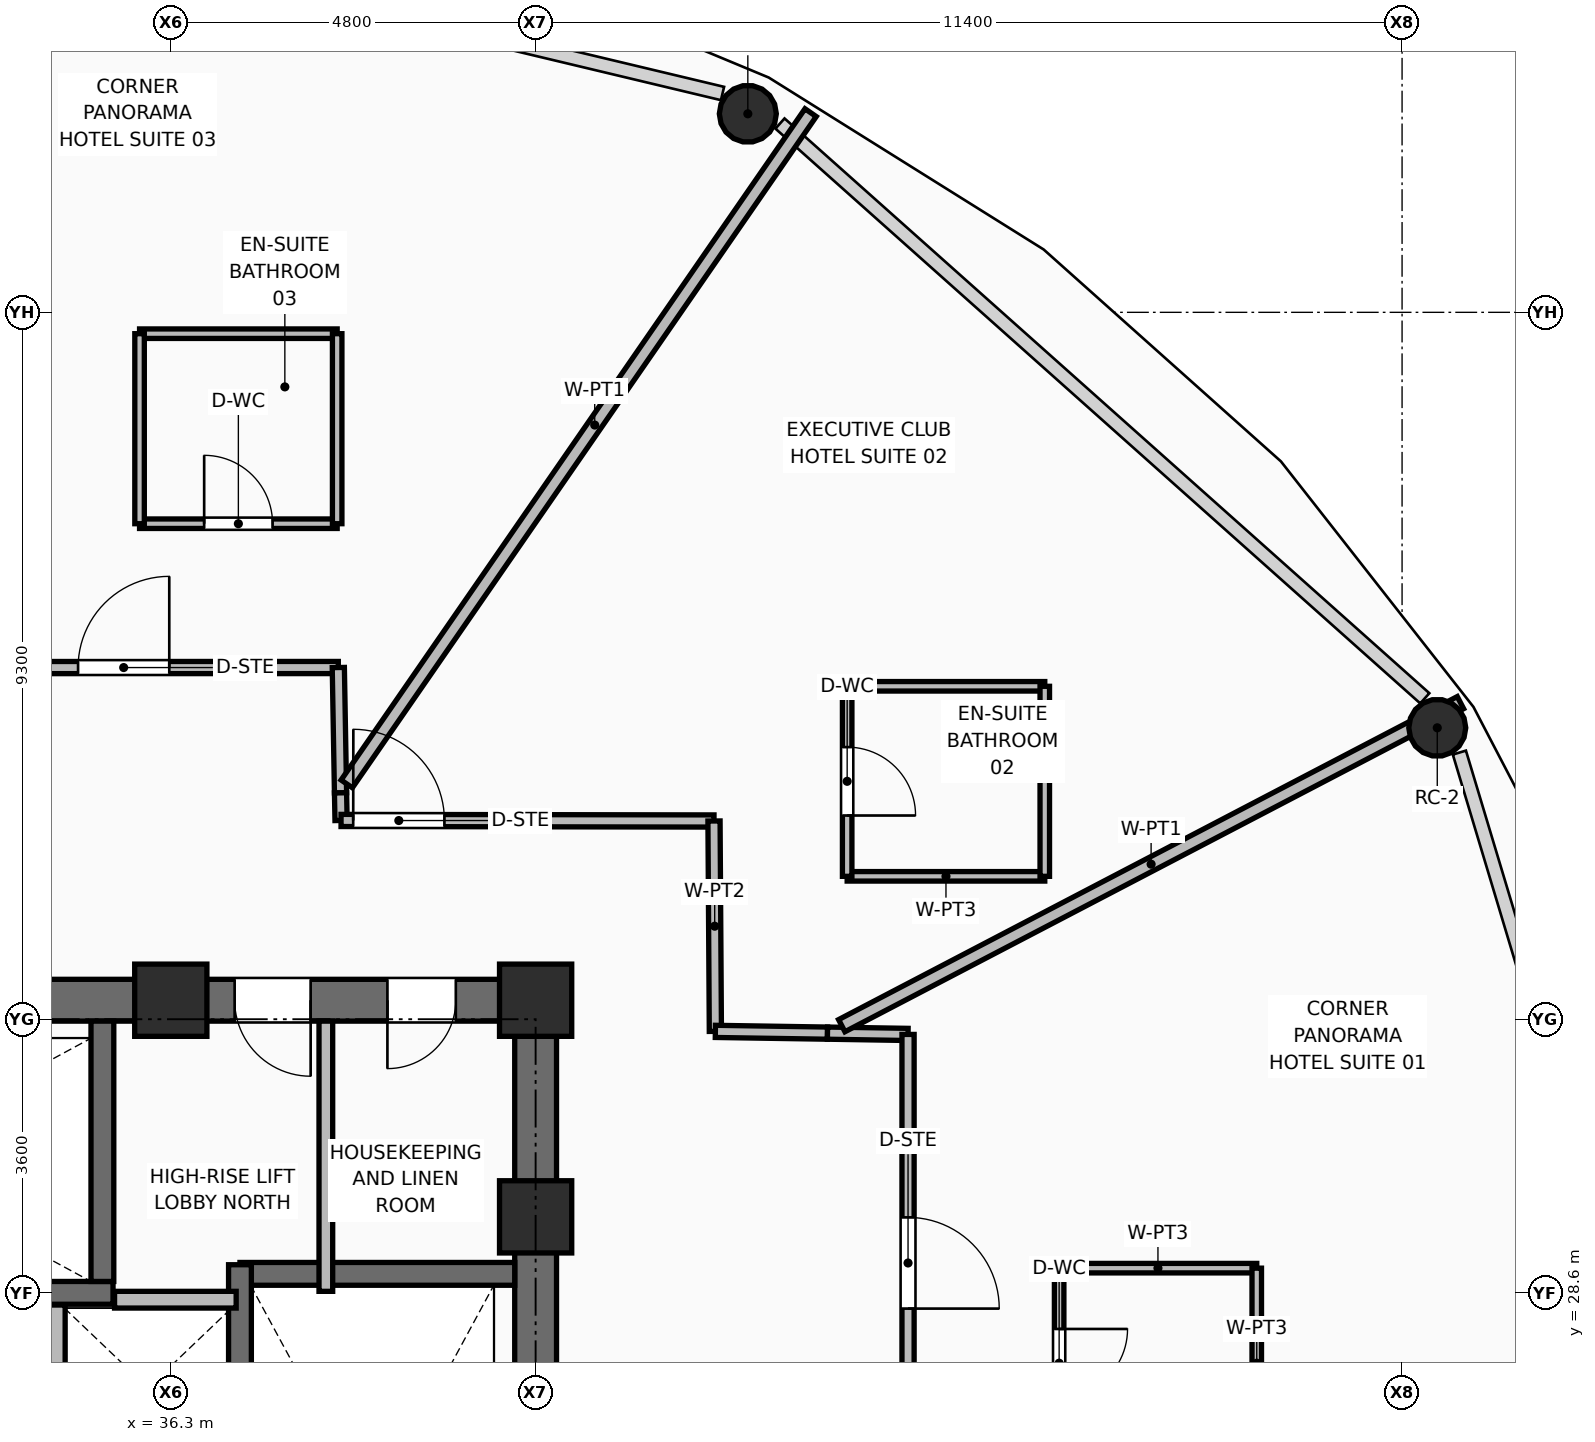
"""IFC4 building model, lengths in metres.
Left out: names, types, materials, properties, quantities, classifications, styles, units other than length and angle.
Written with IfcOpenShell. Run it as: python <this file> out.ifc"""

import sys

from ifc_helpers import new_model, si_unit, direction, frame, frame_2d, origin, origin_2d, place, context, subcontext, project, spatial, rectangle, hollow_circle, extrude, element, fill, save


model = new_model("IFC4")
c1 = context("Model", 3, precision=1e-05, world=origin(), true_north=direction((0.0, 1.0)))
c2 = subcontext(c1, "Body", "Model", "MODEL_VIEW")
j1 = project(units=[si_unit("LENGTHUNIT", "METRE"), si_unit("PLANEANGLEUNIT", "RADIAN")], contexts=[c1])
p1 = place(None, origin())
s1 = spatial("IfcSite", under=j1, at=p1, CompositionType="ELEMENT")
p2 = place(p1, origin())
s2 = spatial("IfcBuilding", under=s1, at=p2, CompositionType="ELEMENT")
p3 = place(p2, frame((0.0, 0.0, 157.2)))
s3 = spatial("IfcBuildingStorey", under=s2, at=p3, CompositionType="ELEMENT", Elevation=157.2)
for number, where, z_axis, x_axis in (
    (1, (41.1, 29.6, 0.0), (0.0, 0.0, 1.0), (1.0, 0.0, 0.0)),
    (2, (36.3, 32.45, 0.0), (0.0, 0.0, 1.0), (1.0, 0.0, 0.0)),
    (3, (41.1, 32.45, 0.0), (0.0, 0.0, 1.0), (1.0, 0.0, 0.0)),
):
    element("IfcColumn", number, at=place(p3, frame(where, z_axis=z_axis, x_axis=x_axis)), inside=s3, PredefinedType="COLUMN", context=c2, shape_type="SweptSolid", body=[
        extrude(rectangle(XDim=0.95, YDim=0.95, at=origin_2d()), origin(), (0.0, 0.0, 1.0), 3.75),
    ])
for number, where, z_axis, x_axis in (
    (4, (52.963, 36.034, 0.0), (0.0, 0.0, 1.0), (1.0, 0.0, 0.0)),
    (5, (43.892, 44.112, 0.0), (0.0, 0.0, 1.0), (1.0, 0.0, 0.0)),
):
    element("IfcColumn", number, at=place(p3, frame(where, z_axis=z_axis, x_axis=x_axis)), inside=s3, PredefinedType="COLUMN", context=c2, shape_type="SweptSolid", body=[
        extrude(hollow_circle(Radius=0.375, WallThickness=0.035, at=origin_2d()), origin(), (0.0, 0.0, 1.0), 3.57),
    ])
p4 = place(p3, frame((34.8, 26.23, 0.0), z_axis=(0.0, 0.0, 1.0), x_axis=(0.0, 1.0, 0.0)))
e6 = element("IfcWall", 6, at=p4, inside=s3, PredefinedType="PARTITIONING", context=c2, shape_type="SweptSolid", body=[
    extrude(rectangle(XDim=2.21, YDim=0.22, at=frame_2d((1.105, 0.0))), origin(), (0.0, 0.0, 1.0), 3.545),
])
p5 = place(p3, frame((21.625, 32.45, 0.0), z_axis=(0.0, 0.0, 1.0), x_axis=(1.0, 0.0, 0.0)))
e7 = element("IfcWall", 7, at=p5, inside=s3, PredefinedType="SHEAR", context=c2, shape_type="SweptSolid", body=[
    extrude(rectangle(XDim=19.75, YDim=0.55, at=frame_2d((9.875, 0.0))), origin(), (0.0, 0.0, 1.0), 3.57),
])
p6 = place(p5, frame((2.125, 0.0, 0.0)))
e8 = element("IfcOpeningElement", 8, at=p6, cuts=e7, PredefinedType="OPENING", context=c2, shape_type="SweptSolid", body=[
    extrude(rectangle(XDim=1.1, YDim=2.1, at=frame_2d((0.55, 1.05))), frame((0.0, 0.285, 0.0), z_axis=(0.0, -1.0, 0.0), x_axis=(1.0, 0.0, 0.0)), (0.0, 0.0, 1.0), 0.57),
])
p7 = place(p5, frame((15.515, 0.0, 0.0)))
e9 = element("IfcOpeningElement", 9, at=p7, cuts=e7, PredefinedType="OPENING", context=c2, shape_type="SweptSolid", body=[
    extrude(rectangle(XDim=1.0, YDim=2.1, at=frame_2d((0.5, 1.05))), frame((0.0, 0.285, 0.0), z_axis=(0.0, -1.0, 0.0), x_axis=(1.0, 0.0, 0.0)), (0.0, 0.0, 1.0), 0.57),
])
p8 = place(p5, frame((17.525, 0.0, 0.0)))
e10 = element("IfcOpeningElement", 10, at=p8, cuts=e7, PredefinedType="OPENING", context=c2, shape_type="SweptSolid", body=[
    extrude(rectangle(XDim=0.9, YDim=2.1, at=frame_2d((0.45, 1.05))), frame((0.0, 0.285, 0.0), z_axis=(0.0, -1.0, 0.0), x_axis=(1.0, 0.0, 0.0)), (0.0, 0.0, 1.0), 0.57),
])
p9 = place(p3, frame((41.1, 18.075, 0.0), z_axis=(0.0, 0.0, 1.0), x_axis=(0.0, 1.0, 0.0)))
e11 = element("IfcWall", 11, at=p9, inside=s3, PredefinedType="SHEAR", context=c2, shape_type="SweptSolid", body=[
    extrude(rectangle(XDim=14.1, YDim=0.55, at=frame_2d((7.05, 0.0))), origin(), (0.0, 0.0, 1.0), 3.57),
])
p10 = place(p9, frame((3.385, 0.0, 0.0)))
e12 = element("IfcOpeningElement", 12, at=p10, cuts=e11, PredefinedType="OPENING", context=c2, shape_type="SweptSolid", body=[
    extrude(rectangle(XDim=1.05, YDim=2.1, at=frame_2d((0.525, 1.05))), frame((0.0, 0.285, 0.0), z_axis=(0.0, -1.0, 0.0), x_axis=(1.0, 0.0, 0.0)), (0.0, 0.0, 1.0), 0.57),
])
p11 = place(p3, frame((37.21, 28.85, 0.0), z_axis=(0.0, 0.0, 1.0), x_axis=(1.0, 0.0, 0.0)))
e13 = element("IfcWall", 13, at=p11, inside=s3, PredefinedType="SHEAR", context=c2, shape_type="SweptSolid", body=[
    extrude(rectangle(XDim=3.615, YDim=0.3, at=frame_2d((1.808, 0.0))), origin(), (0.0, 0.0, 1.0), 3.57),
])
p12 = place(p3, frame((37.21, 20.98, 0.0), z_axis=(0.0, 0.0, 1.0), x_axis=(0.0, 1.0, 0.0)))
e14 = element("IfcWall", 14, at=p12, inside=s3, PredefinedType="SHEAR", context=c2, shape_type="SweptSolid", body=[
    extrude(rectangle(XDim=7.99, YDim=0.3, at=frame_2d((3.995, 0.0))), origin(), (0.0, 0.0, 1.0), 3.57),
])
p13 = place(p3, frame((27.51, 28.6, 0.0), z_axis=(0.0, 0.0, 1.0), x_axis=(1.0, 0.0, 0.0)))
e15 = element("IfcWall", 15, at=p13, inside=s3, PredefinedType="SHEAR", context=c2, shape_type="SweptSolid", body=[
    extrude(rectangle(XDim=8.03, YDim=0.3, at=frame_2d((4.015, 0.0))), origin(), (0.0, 0.0, 1.0), 3.57),
])
p14 = place(p3, frame((35.4, 28.75, 0.0), z_axis=(0.0, 0.0, 1.0), x_axis=(0.0, 1.0, 0.0)))
e16 = element("IfcWall", 16, at=p14, inside=s3, PredefinedType="SHEAR", context=c2, shape_type="SweptSolid", body=[
    extrude(rectangle(XDim=3.425, YDim=0.3, at=frame_2d((1.712, 0.0))), origin(), (0.0, 0.0, 1.0), 3.57),
])
p15 = place(p3, frame((35.56, 28.51, 0.0), z_axis=(0.0, 0.0, 1.0), x_axis=(1.0, 0.0, 0.0)))
e17 = element("IfcWall", 17, at=p15, inside=s3, PredefinedType="PARTITIONING", context=c2, shape_type="SweptSolid", body=[
    extrude(rectangle(XDim=1.6, YDim=0.22, at=frame_2d((0.8, 0.0))), origin(), (0.0, 0.0, 1.0), 3.55),
])
p16 = place(p3, frame((38.34, 28.62, 0.0), z_axis=(0.0, 0.0, 1.0), x_axis=(0.0, 1.0, 0.0)))
e18 = element("IfcWall", 18, at=p16, inside=s3, PredefinedType="PARTITIONING", context=c2, shape_type="SweptSolid", body=[
    extrude(rectangle(XDim=3.555, YDim=0.18, at=frame_2d((1.777, 0.0))), origin(), (0.0, 0.0, 1.0), 3.55),
])
p17 = place(p3, frame((32.414, 36.826, 0.0), z_axis=(0.0, 0.0, 1.0), x_axis=(0.999999987142, 0.000160359203, 0.0)))
e19 = element("IfcWall", 19, at=p17, inside=s3, PredefinedType="PARTITIONING", context=c2, shape_type="SweptSolid", body=[
    extrude(rectangle(XDim=6.09, YDim=0.16, at=frame_2d((3.045, 0.0))), origin(), (0.0, 0.0, 1.0), 3.55),
])
p18 = place(p17, frame((2.666, 0.0, 0.0)))
e20 = element("IfcOpeningElement", 20, at=p18, cuts=e19, PredefinedType="OPENING", context=c2, shape_type="SweptSolid", body=[
    extrude(rectangle(XDim=1.2, YDim=2.1, at=frame_2d((0.6, 1.05))), frame((0.0, 0.09, 0.0), z_axis=(0.0, -1.0, 0.0), x_axis=(1.0, 0.0, 0.0)), (0.0, 0.0, 1.0), 0.18),
])
p19 = place(p3, frame((38.504, 36.827, 0.0), z_axis=(0.0, 0.0, 1.0), x_axis=(0.017616454452, -0.999844818226, 0.0)))
e21 = element("IfcWall", 21, at=p19, inside=s3, PredefinedType="PARTITIONING", context=c2, shape_type="SweptSolid", body=[
    extrude(rectangle(XDim=1.649, YDim=0.16, at=frame_2d((0.825, 0.0))), origin(), (0.0, 0.0, 1.0), 3.55),
])
p20 = place(p3, frame((38.533, 35.178, 0.0), z_axis=(0.0, 0.0, 1.0), x_axis=(0.01949864601, -0.99980988333, 0.0)))
e22 = element("IfcWall", 22, at=p20, inside=s3, PredefinedType="PARTITIONING", context=c2, shape_type="SweptSolid", body=[
    extrude(rectangle(XDim=0.363, YDim=0.16, at=frame_2d((0.182, 0.0))), origin(), (0.0, 0.0, 1.0), 3.55),
])
p21 = place(p3, frame((38.54, 34.815, 0.0), z_axis=(0.0, 0.0, 1.0), x_axis=(0.999999029632, -0.001393102783, 0.0)))
e23 = element("IfcWall", 23, at=p21, inside=s3, PredefinedType="PARTITIONING", context=c2, shape_type="SweptSolid", body=[
    extrude(rectangle(XDim=4.907, YDim=0.16, at=frame_2d((2.454, 0.0))), origin(), (0.0, 0.0, 1.0), 3.006),
])
p22 = place(p21, frame((0.16, 0.0, 0.0)))
e24 = element("IfcOpeningElement", 24, at=p22, cuts=e23, PredefinedType="OPENING", context=c2, shape_type="SweptSolid", body=[
    extrude(rectangle(XDim=1.2, YDim=2.1, at=frame_2d((0.6, 1.05))), frame((0.0, 0.09, 0.0), z_axis=(0.0, -1.0, 0.0), x_axis=(1.0, 0.0, 0.0)), (0.0, 0.0, 1.0), 0.18),
])
p23 = place(p3, frame((43.447, 34.808, 0.0), z_axis=(0.0, 0.0, 1.0), x_axis=(0.006526585281, -0.999978701615, 0.0)))
e25 = element("IfcWall", 25, at=p23, inside=s3, PredefinedType="PARTITIONING", context=c2, shape_type="SweptSolid", body=[
    extrude(rectangle(XDim=2.768, YDim=0.16, at=frame_2d((1.384, 0.0))), origin(), (0.0, 0.0, 1.0), 3.006),
])
p24 = place(p3, frame((43.465, 32.04, 0.0), z_axis=(0.0, 0.0, 1.0), x_axis=(0.999878959925, -0.015558454268, 0.0)))
e26 = element("IfcWall", 26, at=p24, inside=s3, PredefinedType="PARTITIONING", context=c2, shape_type="SweptSolid", body=[
    extrude(rectangle(XDim=1.475, YDim=0.16, at=frame_2d((0.738, 0.0))), origin(), (0.0, 0.0, 1.0), 3.55),
])
p25 = place(p3, frame((44.94, 32.017, 0.0), z_axis=(0.0, 0.0, 1.0), x_axis=(0.999870072285, -0.016119508305, 0.0)))
e27 = element("IfcWall", 27, at=p25, inside=s3, PredefinedType="PARTITIONING", context=c2, shape_type="SweptSolid", body=[
    extrude(rectangle(XDim=1.06, YDim=0.16, at=frame_2d((0.53, 0.0))), origin(), (0.0, 0.0, 1.0), 3.55),
])
p26 = place(p3, frame((46.0, 32.0, 0.0), z_axis=(0.0, 0.0, 1.0), x_axis=(0.0, -1.0, 0.0)))
e28 = element("IfcWall", 28, at=p26, inside=s3, PredefinedType="PARTITIONING", context=c2, shape_type="SweptSolid", body=[
    extrude(rectangle(XDim=6.313, YDim=0.16, at=frame_2d((3.156, 0.0))), origin(), (0.0, 0.0, 1.0), 3.55),
])
p27 = place(p26, frame((2.407, 0.0, 0.0)))
e29 = element("IfcOpeningElement", 29, at=p27, cuts=e28, PredefinedType="OPENING", context=c2, shape_type="SweptSolid", body=[
    extrude(rectangle(XDim=1.2, YDim=2.1, at=frame_2d((0.6, 1.05))), frame((0.0, 0.09, 0.0), z_axis=(0.0, -1.0, 0.0), x_axis=(1.0, 0.0, 0.0)), (0.0, 0.0, 1.0), 0.18),
])
p28 = place(p3, frame((45.128, 32.115, 0.0), z_axis=(0.0, 0.0, 1.0), x_axis=(0.886452073938, 0.46282039779, 0.0)))
e30 = element("IfcWall", 30, at=p28, inside=s3, PredefinedType="PARTITIONING", context=c2, shape_type="SweptSolid", body=[
    extrude(rectangle(XDim=9.183, YDim=0.18, at=frame_2d((4.591, 0.0))), origin(), (0.0, 0.0, 1.0), 2.852),
])
p29 = place(p3, frame((38.615, 35.296, 0.0), z_axis=(0.0, 0.0, 1.0), x_axis=(0.568530950042, 0.822661873946, 0.0)))
e31 = element("IfcWall", 31, at=p29, inside=s3, PredefinedType="PARTITIONING", context=c2, shape_type="SweptSolid", body=[
    extrude(rectangle(XDim=10.735, YDim=0.18, at=frame_2d((5.367, 0.0))), origin(), (0.0, 0.0, 1.0), 2.852),
])
p30 = place(p3, frame((47.988, 28.925, 0.0), z_axis=(0.0, 0.0, 1.0), x_axis=(1.0, 0.0, 0.0)))
e32 = element("IfcWall", 32, at=p30, inside=s3, PredefinedType="PARTITIONING", context=c2, shape_type="SweptSolid", body=[
    extrude(rectangle(XDim=2.6, YDim=0.125, at=frame_2d((1.3, 0.0))), origin(), (0.0, 0.0, 1.0), 3.55),
])
p31 = place(p3, frame((47.988, 26.425, 0.0), z_axis=(0.0, 0.0, 1.0), x_axis=(0.0, 1.0, 0.0)))
e33 = element("IfcWall", 33, at=p31, inside=s3, PredefinedType="PARTITIONING", context=c2, shape_type="SweptSolid", body=[
    extrude(rectangle(XDim=2.5, YDim=0.125, at=frame_2d((1.25, 0.0))), origin(), (0.0, 0.0, 1.0), 3.55),
])
p32 = place(p31, frame((0.8, 0.0, 0.0)))
e34 = element("IfcOpeningElement", 34, at=p32, cuts=e33, PredefinedType="OPENING", context=c2, shape_type="SweptSolid", body=[
    extrude(rectangle(XDim=0.9, YDim=2.1, at=frame_2d((0.45, 1.05))), frame((0.0, 0.073, 0.0), z_axis=(0.0, -1.0, 0.0), x_axis=(1.0, 0.0, 0.0)), (0.0, 0.0, 1.0), 0.145),
])
p33 = place(p3, frame((50.588, 26.425, 0.0), z_axis=(0.0, 0.0, 1.0), x_axis=(0.0, 1.0, 0.0)))
e35 = element("IfcWall", 35, at=p33, inside=s3, PredefinedType="PARTITIONING", context=c2, shape_type="SweptSolid", body=[
    extrude(rectangle(XDim=2.5, YDim=0.125, at=frame_2d((1.25, 0.0))), origin(), (0.0, 0.0, 1.0), 3.55),
])
p34 = place(p3, frame((45.199, 34.08, 0.0), z_axis=(0.0, 0.0, 1.0), x_axis=(1.0, 0.0, 0.0)))
e36 = element("IfcWall", 36, at=p34, inside=s3, PredefinedType="PARTITIONING", context=c2, shape_type="SweptSolid", body=[
    extrude(rectangle(XDim=2.6, YDim=0.125, at=frame_2d((1.3, 0.0))), origin(), (0.0, 0.0, 1.0), 3.006),
])
p35 = place(p3, frame((45.199, 36.58, 0.0), z_axis=(0.0, 0.0, 1.0), x_axis=(1.0, 0.0, 0.0)))
e37 = element("IfcWall", 37, at=p35, inside=s3, PredefinedType="PARTITIONING", context=c2, shape_type="SweptSolid", body=[
    extrude(rectangle(XDim=2.6, YDim=0.125, at=frame_2d((1.3, 0.0))), origin(), (0.0, 0.0, 1.0), 3.55),
])
p36 = place(p3, frame((45.199, 34.08, 0.0), z_axis=(0.0, 0.0, 1.0), x_axis=(0.0, 1.0, 0.0)))
e38 = element("IfcWall", 38, at=p36, inside=s3, PredefinedType="PARTITIONING", context=c2, shape_type="SweptSolid", body=[
    extrude(rectangle(XDim=2.5, YDim=0.125, at=frame_2d((1.25, 0.0))), origin(), (0.0, 0.0, 1.0), 3.55),
])
p37 = place(p36, frame((0.8, 0.0, 0.0)))
e39 = element("IfcOpeningElement", 39, at=p37, cuts=e38, PredefinedType="OPENING", context=c2, shape_type="SweptSolid", body=[
    extrude(rectangle(XDim=0.9, YDim=2.1, at=frame_2d((0.45, 1.05))), frame((0.0, 0.073, 0.0), z_axis=(0.0, -1.0, 0.0), x_axis=(1.0, 0.0, 0.0)), (0.0, 0.0, 1.0), 0.145),
])
p38 = place(p3, frame((47.799, 34.08, 0.0), z_axis=(0.0, 0.0, 1.0), x_axis=(0.0, 1.0, 0.0)))
e40 = element("IfcWall", 40, at=p38, inside=s3, PredefinedType="PARTITIONING", context=c2, shape_type="SweptSolid", body=[
    extrude(rectangle(XDim=2.5, YDim=0.125, at=frame_2d((1.25, 0.0))), origin(), (0.0, 0.0, 1.0), 3.006),
])
p39 = place(p3, frame((35.889, 38.719, 0.0), z_axis=(0.0, 0.0, 1.0), x_axis=(1.0, 0.0, 0.0)))
e41 = element("IfcWall", 41, at=p39, inside=s3, PredefinedType="PARTITIONING", context=c2, shape_type="SweptSolid", body=[
    extrude(rectangle(XDim=2.6, YDim=0.125, at=frame_2d((1.3, 0.0))), origin(), (0.0, 0.0, 1.0), 3.55),
])
p40 = place(p39, frame((0.85, 0.0, 0.0)))
e42 = element("IfcOpeningElement", 42, at=p40, cuts=e41, PredefinedType="OPENING", context=c2, shape_type="SweptSolid", body=[
    extrude(rectangle(XDim=0.9, YDim=2.1, at=frame_2d((0.45, 1.05))), frame((0.0, 0.073, 0.0), z_axis=(0.0, -1.0, 0.0), x_axis=(1.0, 0.0, 0.0)), (0.0, 0.0, 1.0), 0.145),
])
p41 = place(p3, frame((35.889, 41.219, 0.0), z_axis=(0.0, 0.0, 1.0), x_axis=(1.0, 0.0, 0.0)))
e43 = element("IfcWall", 43, at=p41, inside=s3, PredefinedType="PARTITIONING", context=c2, shape_type="SweptSolid", body=[
    extrude(rectangle(XDim=2.6, YDim=0.125, at=frame_2d((1.3, 0.0))), origin(), (0.0, 0.0, 1.0), 3.55),
])
for number, where, z_axis, x_axis in (
    (44, (35.889, 38.719, 0.0), (0.0, 0.0, 1.0), (0.0, 1.0, 0.0)),
    (45, (38.489, 38.719, 0.0), (0.0, 0.0, 1.0), (0.0, 1.0, 0.0)),
):
    element("IfcWall", number, at=place(p3, frame(where, z_axis=z_axis, x_axis=x_axis)), inside=s3, PredefinedType="PARTITIONING", context=c2, shape_type="SweptSolid", body=[
        extrude(rectangle(XDim=2.5, YDim=0.125, at=frame_2d((1.25, 0.0))), origin(), (0.0, 0.0, 1.0), 3.55),
    ])
p42 = place(p7, frame((1.0, 0.0, 0.0), z_axis=(0.0, 0.0, 1.0), x_axis=(-1.0, 0.0, 0.0)))
e46 = element("IfcDoor", 46, at=p42, inside=s3, OperationType="SINGLE_SWING_LEFT", PredefinedType="DOOR", context=c2, shape_type="SweptSolid", body=[
    extrude(rectangle(XDim=1.0, YDim=2.1, at=frame_2d((0.5, 1.05))), frame((0.0, 0.025, 0.0), z_axis=(0.0, -1.0, 0.0), x_axis=(1.0, 0.0, 0.0)), (0.0, 0.0, 1.0), 0.05),
])
fill(e9, e46)
p43 = place(p8, frame((0.9, 0.0, 0.0), z_axis=(0.0, 0.0, 1.0), x_axis=(-1.0, 0.0, 0.0)))
e47 = element("IfcDoor", 47, at=p43, inside=s3, OperationType="SINGLE_SWING_RIGHT", PredefinedType="DOOR", context=c2, shape_type="SweptSolid", body=[
    extrude(rectangle(XDim=0.9, YDim=2.1, at=frame_2d((0.45, 1.05))), frame((0.0, 0.025, 0.0), z_axis=(0.0, -1.0, 0.0), x_axis=(1.0, 0.0, 0.0)), (0.0, 0.0, 1.0), 0.05),
])
fill(e10, e47)
p44 = place(p32, frame((0.9, 0.0, 0.0), z_axis=(0.0, 0.0, 1.0), x_axis=(-1.0, 0.0, 0.0)))
e48 = element("IfcDoor", 48, at=p44, inside=s3, OperationType="SINGLE_SWING_LEFT", PredefinedType="DOOR", context=c2, shape_type="SweptSolid", body=[
    extrude(rectangle(XDim=0.9, YDim=2.1, at=frame_2d((0.45, 1.05))), frame((0.0, 0.025, 0.0), z_axis=(0.0, -1.0, 0.0), x_axis=(1.0, 0.0, 0.0)), (0.0, 0.0, 1.0), 0.05),
])
fill(e34, e48)
p45 = place(p27, origin())
e49 = element("IfcDoor", 49, at=p45, inside=s3, OperationType="SINGLE_SWING_RIGHT", PredefinedType="DOOR", context=c2, shape_type="SweptSolid", body=[
    extrude(rectangle(XDim=1.2, YDim=2.1, at=frame_2d((0.6, 1.05))), frame((0.0, 0.025, 0.0), z_axis=(0.0, -1.0, 0.0), x_axis=(1.0, 0.0, 0.0)), (0.0, 0.0, 1.0), 0.05),
])
fill(e29, e49)
p46 = place(p37, frame((0.9, 0.0, 0.0), z_axis=(0.0, 0.0, 1.0), x_axis=(-1.0, 0.0, 0.0)))
e50 = element("IfcDoor", 50, at=p46, inside=s3, OperationType="SINGLE_SWING_RIGHT", PredefinedType="DOOR", context=c2, shape_type="SweptSolid", body=[
    extrude(rectangle(XDim=0.9, YDim=2.1, at=frame_2d((0.45, 1.05))), frame((0.0, 0.025, 0.0), z_axis=(0.0, -1.0, 0.0), x_axis=(1.0, 0.0, 0.0)), (0.0, 0.0, 1.0), 0.05),
])
fill(e39, e50)
p47 = place(p22, origin())
e51 = element("IfcDoor", 51, at=p47, inside=s3, OperationType="SINGLE_SWING_LEFT", PredefinedType="DOOR", context=c2, shape_type="SweptSolid", body=[
    extrude(rectangle(XDim=1.2, YDim=2.1, at=frame_2d((0.6, 1.05))), frame((0.0, 0.025, 0.0), z_axis=(0.0, -1.0, 0.0), x_axis=(1.0, 0.0, 0.0)), (0.0, 0.0, 1.0), 0.05),
])
fill(e24, e51)
p48 = place(p40, origin())
e52 = element("IfcDoor", 52, at=p48, inside=s3, OperationType="SINGLE_SWING_LEFT", PredefinedType="DOOR", context=c2, shape_type="SweptSolid", body=[
    extrude(rectangle(XDim=0.9, YDim=2.1, at=frame_2d((0.45, 1.05))), frame((0.0, 0.025, 0.0), z_axis=(0.0, -1.0, 0.0), x_axis=(1.0, 0.0, 0.0)), (0.0, 0.0, 1.0), 0.05),
])
fill(e42, e52)
p49 = place(p18, origin())
e53 = element("IfcDoor", 53, at=p49, inside=s3, OperationType="SINGLE_SWING_RIGHT", PredefinedType="DOOR", context=c2, shape_type="SweptSolid", body=[
    extrude(rectangle(XDim=1.2, YDim=2.1, at=frame_2d((0.6, 1.05))), frame((0.0, 0.025, 0.0), z_axis=(0.0, -1.0, 0.0), x_axis=(1.0, 0.0, 0.0)), (0.0, 0.0, 1.0), 0.05),
])
fill(e20, e53)
save(model, sys.argv[1])
